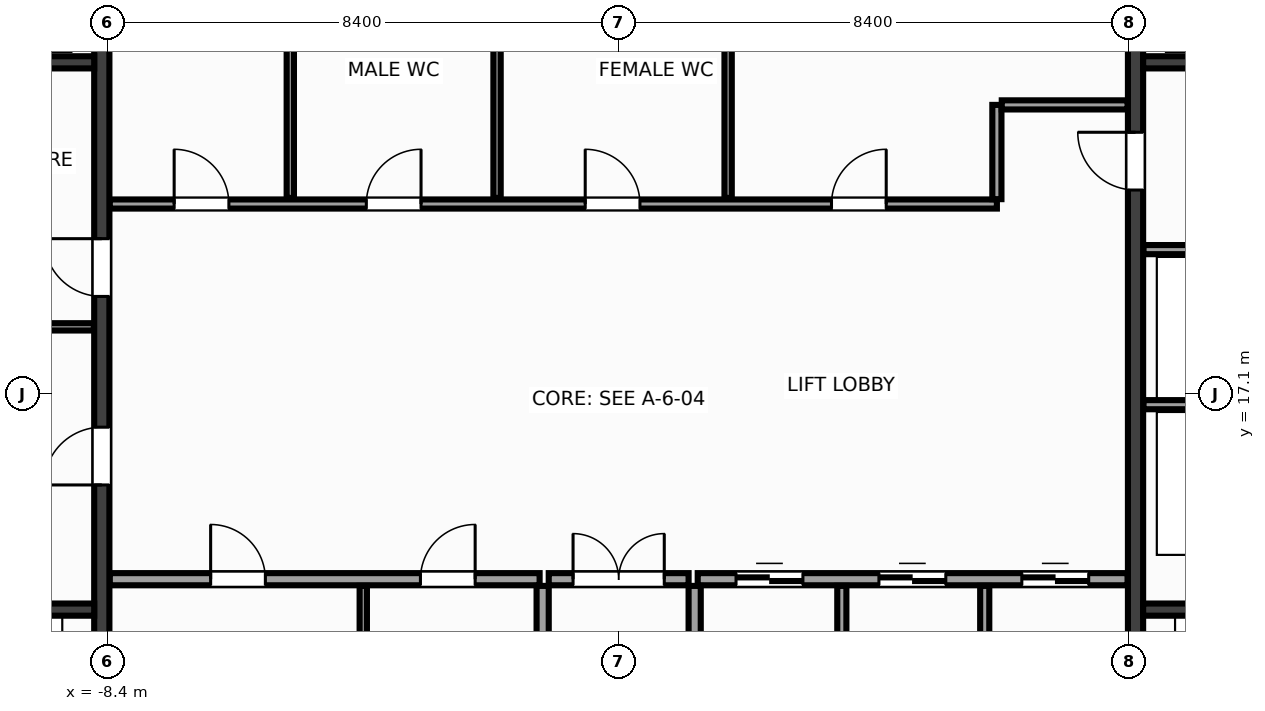
"""IFC4 building model, lengths in metres.
Left out: names, types, materials, properties, quantities, classifications, styles, units other than length and angle.
Written with IfcOpenShell. Run it as: python <this file> out.ifc"""

import sys

from ifc_helpers import new_model, si_unit, direction, frame, frame_2d, origin, place, context, subcontext, project, spatial, rectangle, extrude, source, transform, mapped, element, fill, save


model = new_model("IFC4")
c1 = context("Model", 3, precision=1e-05, world=origin(), true_north=direction((0.0, 1.0)))
c2 = subcontext(c1, "Body", "Model", "MODEL_VIEW")
j1 = project(units=[si_unit("LENGTHUNIT", "METRE"), si_unit("PLANEANGLEUNIT", "RADIAN")], contexts=[c1])
p1 = place(None, origin())
s1 = spatial("IfcSite", under=j1, at=p1, CompositionType="ELEMENT")
p2 = place(p1, origin())
s2 = spatial("IfcBuilding", under=s1, at=p2, CompositionType="ELEMENT")
p3 = place(p2, frame((0.0, 0.0, 120.8)))
s3 = spatial("IfcBuildingStorey", under=s2, at=p3, CompositionType="ELEMENT", Elevation=120.8)
m1 = source(origin(), c2, "Body", "SweptSolid", [
    extrude(rectangle(XDim=12.95, YDim=0.25, at=frame_2d((6.475, 0.0))), origin(), (0.0, 0.0, 1.0), 3.6),
])
p4 = place(p3, frame((-8.5, 10.525, 0.0), z_axis=(0.0, 0.0, 1.0), x_axis=(0.0, 1.0, 0.0)))
e1 = element("IfcWall", 1, at=p4, inside=s3, PredefinedType="SHEAR", context=c2, shape_type="MappedRepresentation", body=[
    mapped(m1, transform((0.0, 0.0, 0.0), x_axis=(1.0, 0.0, 0.0), y_axis=(0.0, 1.0, 0.0), z_axis=(0.0, 0.0, 1.0), scale=1.0)),
])
p5 = place(p4, frame((5.075, 0.0, 0.0)))
e2 = element("IfcOpeningElement", 2, at=p5, cuts=e1, PredefinedType="OPENING", context=c2, shape_type="SweptSolid", body=[
    extrude(rectangle(XDim=0.95, YDim=2.15, at=frame_2d((0.475, 1.075))), frame((0.0, 0.137, 0.0), z_axis=(0.0, -1.0, 0.0), x_axis=(1.0, 0.0, 0.0)), (0.0, 0.0, 1.0), 0.274),
])
p6 = place(p4, frame((8.175, 0.0, 0.0)))
e3 = element("IfcOpeningElement", 3, at=p6, cuts=e1, PredefinedType="OPENING", context=c2, shape_type="SweptSolid", body=[
    extrude(rectangle(XDim=0.95, YDim=2.15, at=frame_2d((0.475, 1.075))), frame((0.0, 0.137, 0.0), z_axis=(0.0, -1.0, 0.0), x_axis=(1.0, 0.0, 0.0)), (0.0, 0.0, 1.0), 0.274),
])
p7 = place(p3, frame((8.5, 10.525, 0.0), z_axis=(0.0, 0.0, 1.0), x_axis=(0.0, 1.0, 0.0)))
e4 = element("IfcWall", 4, at=p7, inside=s3, PredefinedType="SHEAR", context=c2, shape_type="MappedRepresentation", body=[
    mapped(m1, transform((0.0, 0.0, 0.0), x_axis=(1.0, 0.0, 0.0), y_axis=(0.0, 1.0, 0.0), z_axis=(0.0, 0.0, 1.0), scale=1.0)),
])
p8 = place(p7, frame((9.925, 0.0, 0.0)))
e5 = element("IfcOpeningElement", 5, at=p8, cuts=e4, PredefinedType="OPENING", context=c2, shape_type="SweptSolid", body=[
    extrude(rectangle(XDim=0.95, YDim=2.15, at=frame_2d((0.475, 1.075))), frame((0.0, 0.137, 0.0), z_axis=(0.0, -1.0, 0.0), x_axis=(1.0, 0.0, 0.0)), (0.0, 0.0, 1.0), 0.274),
])
m2 = source(origin(), c2, "Body", "SweptSolid", [
    extrude(rectangle(XDim=2.825, YDim=0.2, at=frame_2d((1.413, 0.0))), origin(), (0.0, 0.0, 1.0), 3.6),
])
for number, where, z_axis, x_axis in (
    (6, (-11.45, 13.55, 0.0), (0.0, 0.0, 1.0), (1.0, 0.0, 0.0)),
    (7, (8.625, 13.55, 0.0), (0.0, 0.0, 1.0), (1.0, 0.0, 0.0)),
):
    element("IfcWall", number, at=place(p3, frame(where, z_axis=z_axis, x_axis=x_axis)), inside=s3, PredefinedType="SHEAR", context=c2, shape_type="MappedRepresentation", body=[
        mapped(m2, transform((0.0, 0.0, 0.0), x_axis=(1.0, 0.0, 0.0), y_axis=(0.0, 1.0, 0.0), z_axis=(0.0, 0.0, 1.0), scale=1.0)),
    ])
m3 = source(origin(), c2, "Body", "SweptSolid", [
    extrude(rectangle(XDim=3.02, YDim=0.2, at=frame_2d((1.51, 0.0))), origin(), (0.0, 0.0, 1.0), 3.6),
])
for number, where, z_axis, x_axis in (
    (8, (-11.645, 22.55, 0.0), (0.0, 0.0, 1.0), (1.0, 0.0, 0.0)),
    (9, (8.625, 22.55, 0.0), (0.0, 0.0, 1.0), (1.0, 0.0, 0.0)),
):
    element("IfcWall", number, at=place(p3, frame(where, z_axis=z_axis, x_axis=x_axis)), inside=s3, PredefinedType="SHEAR", context=c2, shape_type="MappedRepresentation", body=[
        mapped(m3, transform((0.0, 0.0, 0.0), x_axis=(1.0, 0.0, 0.0), y_axis=(0.0, 1.0, 0.0), z_axis=(0.0, 0.0, 1.0), scale=1.0)),
    ])
m4 = source(origin(), c2, "Body", "SweptSolid", [
    extrude(rectangle(XDim=3.01, YDim=0.12, at=frame_2d((1.505, 0.0))), origin(), (0.0, 0.0, 1.0), 3.3),
])
p9 = place(p3, frame((-11.64, 18.2, 0.0), z_axis=(0.0, 0.0, 1.0), x_axis=(1.0, 0.0, 0.0)))
e10 = element("IfcWall", 10, at=p9, inside=s3, PredefinedType="PARTITIONING", context=c2, shape_type="MappedRepresentation", body=[
    mapped(m4, transform((0.0, 0.0, 0.0), x_axis=(1.0, 0.0, 0.0), y_axis=(0.0, 1.0, 0.0), z_axis=(0.0, 0.0, 1.0), scale=1.0)),
])
m5 = source(origin(), c2, "Body", "SweptSolid", [
    extrude(rectangle(XDim=3.01, YDim=0.15, at=frame_2d((1.505, 0.0))), origin(), (0.0, 0.0, 1.0), 3.3),
])
for number, where, z_axis, x_axis in (
    (11, (8.63, 16.92, 0.0), (0.0, 0.0, 1.0), (1.0, 0.0, 0.0)),
    (12, (8.63, 19.47, 0.0), (0.0, 0.0, 1.0), (1.0, 0.0, 0.0)),
):
    element("IfcWall", number, at=place(p3, frame(where, z_axis=z_axis, x_axis=x_axis)), inside=s3, PredefinedType="PARTITIONING", context=c2, shape_type="MappedRepresentation", body=[
        mapped(m5, transform((0.0, 0.0, 0.0), x_axis=(1.0, 0.0, 0.0), y_axis=(0.0, 1.0, 0.0), z_axis=(0.0, 0.0, 1.0), scale=1.0)),
    ])
m6 = source(origin(), c2, "Body", "SweptSolid", [
    extrude(rectangle(XDim=7.07, YDim=0.2, at=frame_2d((3.535, 0.0))), origin(), (0.0, 0.0, 1.0), 3.3),
])
p10 = place(p3, frame((-8.37, 14.05, 0.0), z_axis=(0.0, 0.0, 1.0), x_axis=(1.0, 0.0, 0.0)))
e13 = element("IfcWall", 13, at=p10, inside=s3, PredefinedType="PARTITIONING", context=c2, shape_type="MappedRepresentation", body=[
    mapped(m6, transform((0.0, 0.0, 0.0), x_axis=(1.0, 0.0, 0.0), y_axis=(0.0, 1.0, 0.0), z_axis=(0.0, 0.0, 1.0), scale=1.0)),
])
p11 = place(p10, frame((1.66, 0.0, 0.0)))
e14 = element("IfcOpeningElement", 14, at=p11, cuts=e13, PredefinedType="OPENING", context=c2, shape_type="SweptSolid", body=[
    extrude(rectangle(XDim=0.9, YDim=2.15, at=frame_2d((0.45, 1.075))), frame((0.0, 0.112, 0.0), z_axis=(0.0, -1.0, 0.0), x_axis=(1.0, 0.0, 0.0)), (0.0, 0.0, 1.0), 0.224),
])
p12 = place(p10, frame((5.11, 0.0, 0.0)))
e15 = element("IfcOpeningElement", 15, at=p12, cuts=e13, PredefinedType="OPENING", context=c2, shape_type="SweptSolid", body=[
    extrude(rectangle(XDim=0.9, YDim=2.15, at=frame_2d((0.45, 1.075))), frame((0.0, 0.112, 0.0), z_axis=(0.0, -1.0, 0.0), x_axis=(1.0, 0.0, 0.0)), (0.0, 0.0, 1.0), 0.224),
])
p13 = place(p3, frame((1.3, 14.05, 0.0), z_axis=(0.0, 0.0, 1.0), x_axis=(1.0, 0.0, 0.0)))
e16 = element("IfcWall", 16, at=p13, inside=s3, PredefinedType="PARTITIONING", context=c2, shape_type="MappedRepresentation", body=[
    mapped(m6, transform((0.0, 0.0, 0.0), x_axis=(1.0, 0.0, 0.0), y_axis=(0.0, 1.0, 0.0), z_axis=(0.0, 0.0, 1.0), scale=1.0)),
])
p14 = place(p13, frame((0.63, 0.0, 0.0)))
e17 = element("IfcOpeningElement", 17, at=p14, cuts=e16, PredefinedType="OPENING", context=c2, shape_type="SweptSolid", body=[
    extrude(rectangle(XDim=1.1, YDim=2.15, at=frame_2d((0.55, 1.075))), frame((0.0, 0.112, 0.0), z_axis=(0.0, -1.0, 0.0), x_axis=(1.0, 0.0, 0.0)), (0.0, 0.0, 1.0), 0.224),
])
p15 = place(p13, frame((2.98, 0.0, 0.0)))
e18 = element("IfcOpeningElement", 18, at=p15, cuts=e16, PredefinedType="OPENING", context=c2, shape_type="SweptSolid", body=[
    extrude(rectangle(XDim=1.1, YDim=2.15, at=frame_2d((0.55, 1.075))), frame((0.0, 0.112, 0.0), z_axis=(0.0, -1.0, 0.0), x_axis=(1.0, 0.0, 0.0)), (0.0, 0.0, 1.0), 0.224),
])
p16 = place(p13, frame((5.33, 0.0, 0.0)))
e19 = element("IfcOpeningElement", 19, at=p16, cuts=e16, PredefinedType="OPENING", context=c2, shape_type="SweptSolid", body=[
    extrude(rectangle(XDim=1.1, YDim=2.15, at=frame_2d((0.55, 1.075))), frame((0.0, 0.112, 0.0), z_axis=(0.0, -1.0, 0.0), x_axis=(1.0, 0.0, 0.0)), (0.0, 0.0, 1.0), 0.224),
])
m7 = source(origin(), c2, "Body", "SweptSolid", [
    extrude(rectangle(XDim=3.415, YDim=0.2, at=frame_2d((1.708, 0.0))), origin(), (0.0, 0.0, 1.0), 3.3),
])
for number, where, z_axis, x_axis in (
    (20, (-1.25, 10.525, 0.0), (0.0, 0.0, 1.0), (0.0, 1.0, 0.0)),
    (21, (1.25, 10.525, 0.0), (0.0, 0.0, 1.0), (0.0, 1.0, 0.0)),
):
    element("IfcWall", number, at=place(p3, frame(where, z_axis=z_axis, x_axis=x_axis)), inside=s3, PredefinedType="PARTITIONING", context=c2, shape_type="MappedRepresentation", body=[
        mapped(m7, transform((0.0, 0.0, 0.0), x_axis=(1.0, 0.0, 0.0), y_axis=(0.0, 1.0, 0.0), z_axis=(0.0, 0.0, 1.0), scale=1.0)),
    ])
m8 = source(origin(), c2, "Body", "SweptSolid", [
    extrude(rectangle(XDim=2.3, YDim=0.2, at=frame_2d((1.15, 0.0))), origin(), (0.0, 0.0, 1.0), 3.3),
])
p17 = place(p3, frame((-1.15, 14.05, 0.0), z_axis=(0.0, 0.0, 1.0), x_axis=(1.0, 0.0, 0.0)))
e22 = element("IfcWall", 22, at=p17, inside=s3, PredefinedType="PARTITIONING", context=c2, shape_type="MappedRepresentation", body=[
    mapped(m8, transform((0.0, 0.0, 0.0), x_axis=(1.0, 0.0, 0.0), y_axis=(0.0, 1.0, 0.0), z_axis=(0.0, 0.0, 1.0), scale=1.0)),
])
p18 = place(p17, frame((0.4, 0.0, 0.0)))
e23 = element("IfcOpeningElement", 23, at=p18, cuts=e22, PredefinedType="OPENING", context=c2, shape_type="SweptSolid", body=[
    extrude(rectangle(XDim=1.5, YDim=2.2, at=frame_2d((0.75, 1.1))), frame((0.0, 0.112, 0.0), z_axis=(0.0, -1.0, 0.0), x_axis=(1.0, 0.0, 0.0)), (0.0, 0.0, 1.0), 0.224),
])
m9 = source(origin(), c2, "Body", "SweptSolid", [
    extrude(rectangle(XDim=14.59, YDim=0.15, at=frame_2d((7.295, 0.0))), origin(), (0.0, 0.0, 1.0), 3.3),
])
p19 = place(p3, frame((-8.37, 20.22, 0.0), z_axis=(0.0, 0.0, 1.0), x_axis=(1.0, 0.0, 0.0)))
e24 = element("IfcWall", 24, at=p19, inside=s3, PredefinedType="PARTITIONING", context=c2, shape_type="MappedRepresentation", body=[
    mapped(m9, transform((0.0, 0.0, 0.0), x_axis=(1.0, 0.0, 0.0), y_axis=(0.0, 1.0, 0.0), z_axis=(0.0, 0.0, 1.0), scale=1.0)),
])
p20 = place(p19, frame((1.06, 0.0, 0.0)))
e25 = element("IfcOpeningElement", 25, at=p20, cuts=e24, PredefinedType="OPENING", context=c2, shape_type="SweptSolid", body=[
    extrude(rectangle(XDim=0.9, YDim=2.15, at=frame_2d((0.45, 1.075))), frame((0.0, 0.087, 0.0), z_axis=(0.0, -1.0, 0.0), x_axis=(1.0, 0.0, 0.0)), (0.0, 0.0, 1.0), 0.174),
])
p21 = place(p19, frame((4.22, 0.0, 0.0)))
e26 = element("IfcOpeningElement", 26, at=p21, cuts=e24, PredefinedType="OPENING", context=c2, shape_type="SweptSolid", body=[
    extrude(rectangle(XDim=0.9, YDim=2.15, at=frame_2d((0.45, 1.075))), frame((0.0, 0.087, 0.0), z_axis=(0.0, -1.0, 0.0), x_axis=(1.0, 0.0, 0.0)), (0.0, 0.0, 1.0), 0.174),
])
p22 = place(p19, frame((7.82, 0.0, 0.0)))
e27 = element("IfcOpeningElement", 27, at=p22, cuts=e24, PredefinedType="OPENING", context=c2, shape_type="SweptSolid", body=[
    extrude(rectangle(XDim=0.9, YDim=2.15, at=frame_2d((0.45, 1.075))), frame((0.0, 0.087, 0.0), z_axis=(0.0, -1.0, 0.0), x_axis=(1.0, 0.0, 0.0)), (0.0, 0.0, 1.0), 0.174),
])
p23 = place(p19, frame((11.87, 0.0, 0.0)))
e28 = element("IfcOpeningElement", 28, at=p23, cuts=e24, PredefinedType="OPENING", context=c2, shape_type="SweptSolid", body=[
    extrude(rectangle(XDim=0.9, YDim=2.15, at=frame_2d((0.45, 1.075))), frame((0.0, 0.087, 0.0), z_axis=(0.0, -1.0, 0.0), x_axis=(1.0, 0.0, 0.0)), (0.0, 0.0, 1.0), 0.174),
])
m10 = source(origin(), c2, "Body", "SweptSolid", [
    extrude(rectangle(XDim=1.55, YDim=0.15, at=frame_2d((0.775, 0.0))), origin(), (0.0, 0.0, 1.0), 3.3),
])
p24 = place(p3, frame((6.22, 20.3, 0.0), z_axis=(0.0, 0.0, 1.0), x_axis=(0.0, 1.0, 0.0)))
e29 = element("IfcWall", 29, at=p24, inside=s3, PredefinedType="PARTITIONING", context=c2, shape_type="MappedRepresentation", body=[
    mapped(m10, transform((0.0, 0.0, 0.0), x_axis=(1.0, 0.0, 0.0), y_axis=(0.0, 1.0, 0.0), z_axis=(0.0, 0.0, 1.0), scale=1.0)),
])
m11 = source(origin(), c2, "Body", "SweptSolid", [
    extrude(rectangle(XDim=2.07, YDim=0.15, at=frame_2d((1.035, 0.0))), origin(), (0.0, 0.0, 1.0), 3.3),
])
p25 = place(p3, frame((6.3, 21.85, 0.0), z_axis=(0.0, 0.0, 1.0), x_axis=(1.0, 0.0, 0.0)))
e30 = element("IfcWall", 30, at=p25, inside=s3, PredefinedType="PARTITIONING", context=c2, shape_type="MappedRepresentation", body=[
    mapped(m11, transform((0.0, 0.0, 0.0), x_axis=(1.0, 0.0, 0.0), y_axis=(0.0, 1.0, 0.0), z_axis=(0.0, 0.0, 1.0), scale=1.0)),
])
m12 = source(origin(), c2, "Body", "SweptSolid", [
    extrude(rectangle(XDim=3.415, YDim=0.12, at=frame_2d((1.708, 0.0))), origin(), (0.0, 0.0, 1.0), 3.3),
])
p26 = place(p3, frame((-4.2, 10.525, 0.0), z_axis=(0.0, 0.0, 1.0), x_axis=(0.0, 1.0, 0.0)))
e31 = element("IfcWall", 31, at=p26, inside=s3, PredefinedType="PARTITIONING", context=c2, shape_type="MappedRepresentation", body=[
    mapped(m12, transform((0.0, 0.0, 0.0), x_axis=(1.0, 0.0, 0.0), y_axis=(0.0, 1.0, 0.0), z_axis=(0.0, 0.0, 1.0), scale=1.0)),
])
m13 = source(origin(), c2, "Body", "SweptSolid", [
    extrude(rectangle(XDim=3.415, YDim=0.15, at=frame_2d((1.708, 0.0))), origin(), (0.0, 0.0, 1.0), 3.3),
])
for number, where, z_axis, x_axis in (
    (32, (3.67, 10.525, 0.0), (0.0, 0.0, 1.0), (0.0, 1.0, 0.0)),
    (33, (6.02, 10.525, 0.0), (0.0, 0.0, 1.0), (0.0, 1.0, 0.0)),
):
    element("IfcWall", number, at=place(p3, frame(where, z_axis=z_axis, x_axis=x_axis)), inside=s3, PredefinedType="PARTITIONING", context=c2, shape_type="MappedRepresentation", body=[
        mapped(m13, transform((0.0, 0.0, 0.0), x_axis=(1.0, 0.0, 0.0), y_axis=(0.0, 1.0, 0.0), z_axis=(0.0, 0.0, 1.0), scale=1.0)),
    ])
m14 = source(origin(), c2, "Body", "SweptSolid", [
    extrude(rectangle(XDim=3.115, YDim=0.12, at=frame_2d((1.558, 0.0))), origin(), (0.0, 0.0, 1.0), 3.3),
])
for number, where, z_axis, x_axis in (
    (34, (-5.4, 20.32, 0.0), (0.0, 0.0, 1.0), (0.0, 1.0, 0.0)),
    (35, (-2.0, 20.32, 0.0), (0.0, 0.0, 1.0), (0.0, 1.0, 0.0)),
    (36, (1.8, 20.32, 0.0), (0.0, 0.0, 1.0), (0.0, 1.0, 0.0)),
):
    element("IfcWall", number, at=place(p3, frame(where, z_axis=z_axis, x_axis=x_axis)), inside=s3, PredefinedType="PARTITIONING", context=c2, shape_type="MappedRepresentation", body=[
        mapped(m14, transform((0.0, 0.0, 0.0), x_axis=(1.0, 0.0, 0.0), y_axis=(0.0, 1.0, 0.0), z_axis=(0.0, 0.0, 1.0), scale=1.0)),
    ])
m15 = source(origin(), c2, "Body", "SweptSolid", [
    extrude(rectangle(XDim=0.95, YDim=2.15, at=frame_2d((0.475, 1.075))), frame((0.0, 0.025, 0.0), z_axis=(0.0, -1.0, 0.0), x_axis=(1.0, 0.0, 0.0)), (0.0, 0.0, 1.0), 0.05),
])
p27 = place(p5, origin())
e37 = element("IfcDoor", 37, at=p27, inside=s3, OperationType="SINGLE_SWING_LEFT", PredefinedType="DOOR", context=c2, shape_type="MappedRepresentation", body=[
    mapped(m15, transform((0.0, 0.0, 0.0), x_axis=(1.0, 0.0, 0.0), y_axis=(0.0, 1.0, 0.0), z_axis=(0.0, 0.0, 1.0), scale=1.0)),
])
fill(e2, e37)
p28 = place(p6, origin())
e38 = element("IfcDoor", 38, at=p28, inside=s3, OperationType="SINGLE_SWING_RIGHT", PredefinedType="DOOR", context=c2, shape_type="MappedRepresentation", body=[
    mapped(m15, transform((0.0, 0.0, 0.0), x_axis=(1.0, 0.0, 0.0), y_axis=(0.0, 1.0, 0.0), z_axis=(0.0, 0.0, 1.0), scale=1.0)),
])
fill(e3, e38)
m16 = source(origin(), c2, "Body", "SweptSolid", [
    extrude(rectangle(XDim=0.95, YDim=2.15, at=frame_2d((0.475, 1.075))), frame((0.0, 0.025, 0.0), z_axis=(0.0, -1.0, 0.0), x_axis=(1.0, 0.0, 0.0)), (0.0, 0.0, 1.0), 0.05),
])
p29 = place(p8, origin())
e39 = element("IfcDoor", 39, at=p29, inside=s3, OperationType="SINGLE_SWING_RIGHT", PredefinedType="DOOR", context=c2, shape_type="MappedRepresentation", body=[
    mapped(m16, transform((0.0, 0.0, 0.0), x_axis=(1.0, 0.0, 0.0), y_axis=(0.0, 1.0, 0.0), z_axis=(0.0, 0.0, 1.0), scale=1.0)),
])
fill(e5, e39)
m17 = source(origin(), c2, "Body", "SweptSolid", [
    extrude(rectangle(XDim=0.9, YDim=2.15, at=frame_2d((0.45, 1.075))), frame((0.0, 0.025, 0.0), z_axis=(0.0, -1.0, 0.0), x_axis=(1.0, 0.0, 0.0)), (0.0, 0.0, 1.0), 0.05),
])
p30 = place(p11, origin())
e40 = element("IfcDoor", 40, at=p30, inside=s3, OperationType="SINGLE_SWING_LEFT", PredefinedType="DOOR", context=c2, shape_type="MappedRepresentation", body=[
    mapped(m17, transform((0.0, 0.0, 0.0), x_axis=(1.0, 0.0, 0.0), y_axis=(0.0, 1.0, 0.0), z_axis=(0.0, 0.0, 1.0), scale=1.0)),
])
fill(e14, e40)
p31 = place(p12, origin())
e41 = element("IfcDoor", 41, at=p31, inside=s3, OperationType="SINGLE_SWING_RIGHT", PredefinedType="DOOR", context=c2, shape_type="MappedRepresentation", body=[
    mapped(m17, transform((0.0, 0.0, 0.0), x_axis=(1.0, 0.0, 0.0), y_axis=(0.0, 1.0, 0.0), z_axis=(0.0, 0.0, 1.0), scale=1.0)),
])
fill(e15, e41)
m18 = source(origin(), c2, "Body", "SweptSolid", [
    extrude(rectangle(XDim=1.1, YDim=2.15, at=frame_2d((0.55, 1.075))), frame((0.0, 0.025, 0.0), z_axis=(0.0, -1.0, 0.0), x_axis=(1.0, 0.0, 0.0)), (0.0, 0.0, 1.0), 0.05),
])
p32 = place(p14, origin())
e42 = element("IfcDoor", 42, at=p32, inside=s3, OperationType="DOUBLE_DOOR_SLIDING", PredefinedType="DOOR", context=c2, shape_type="MappedRepresentation", body=[
    mapped(m18, transform((0.0, 0.0, 0.0), x_axis=(1.0, 0.0, 0.0), y_axis=(0.0, 1.0, 0.0), z_axis=(0.0, 0.0, 1.0), scale=1.0)),
])
fill(e17, e42)
p33 = place(p15, origin())
e43 = element("IfcDoor", 43, at=p33, inside=s3, OperationType="DOUBLE_DOOR_SLIDING", PredefinedType="DOOR", context=c2, shape_type="MappedRepresentation", body=[
    mapped(m18, transform((0.0, 0.0, 0.0), x_axis=(1.0, 0.0, 0.0), y_axis=(0.0, 1.0, 0.0), z_axis=(0.0, 0.0, 1.0), scale=1.0)),
])
fill(e18, e43)
p34 = place(p16, origin())
e44 = element("IfcDoor", 44, at=p34, inside=s3, OperationType="DOUBLE_DOOR_SLIDING", PredefinedType="DOOR", context=c2, shape_type="MappedRepresentation", body=[
    mapped(m18, transform((0.0, 0.0, 0.0), x_axis=(1.0, 0.0, 0.0), y_axis=(0.0, 1.0, 0.0), z_axis=(0.0, 0.0, 1.0), scale=1.0)),
])
fill(e19, e44)
m19 = source(origin(), c2, "Body", "SweptSolid", [
    extrude(rectangle(XDim=1.5, YDim=2.2, at=frame_2d((0.75, 1.1))), frame((0.0, 0.025, 0.0), z_axis=(0.0, -1.0, 0.0), x_axis=(1.0, 0.0, 0.0)), (0.0, 0.0, 1.0), 0.05),
])
p35 = place(p18, origin())
e45 = element("IfcDoor", 45, at=p35, inside=s3, OperationType="DOUBLE_DOOR_SINGLE_SWING", PredefinedType="DOOR", context=c2, shape_type="MappedRepresentation", body=[
    mapped(m19, transform((0.0, 0.0, 0.0), x_axis=(1.0, 0.0, 0.0), y_axis=(0.0, 1.0, 0.0), z_axis=(0.0, 0.0, 1.0), scale=1.0)),
])
fill(e23, e45)
p36 = place(p20, origin())
e46 = element("IfcDoor", 46, at=p36, inside=s3, OperationType="SINGLE_SWING_LEFT", PredefinedType="DOOR", context=c2, shape_type="MappedRepresentation", body=[
    mapped(m17, transform((0.0, 0.0, 0.0), x_axis=(1.0, 0.0, 0.0), y_axis=(0.0, 1.0, 0.0), z_axis=(0.0, 0.0, 1.0), scale=1.0)),
])
fill(e25, e46)
p37 = place(p21, origin())
e47 = element("IfcDoor", 47, at=p37, inside=s3, OperationType="SINGLE_SWING_RIGHT", PredefinedType="DOOR", context=c2, shape_type="MappedRepresentation", body=[
    mapped(m17, transform((0.0, 0.0, 0.0), x_axis=(1.0, 0.0, 0.0), y_axis=(0.0, 1.0, 0.0), z_axis=(0.0, 0.0, 1.0), scale=1.0)),
])
fill(e26, e47)
p38 = place(p22, origin())
e48 = element("IfcDoor", 48, at=p38, inside=s3, OperationType="SINGLE_SWING_LEFT", PredefinedType="DOOR", context=c2, shape_type="MappedRepresentation", body=[
    mapped(m17, transform((0.0, 0.0, 0.0), x_axis=(1.0, 0.0, 0.0), y_axis=(0.0, 1.0, 0.0), z_axis=(0.0, 0.0, 1.0), scale=1.0)),
])
fill(e27, e48)
p39 = place(p23, origin())
e49 = element("IfcDoor", 49, at=p39, inside=s3, OperationType="SINGLE_SWING_RIGHT", PredefinedType="DOOR", context=c2, shape_type="MappedRepresentation", body=[
    mapped(m17, transform((0.0, 0.0, 0.0), x_axis=(1.0, 0.0, 0.0), y_axis=(0.0, 1.0, 0.0), z_axis=(0.0, 0.0, 1.0), scale=1.0)),
])
fill(e28, e49)
save(model, sys.argv[1])
